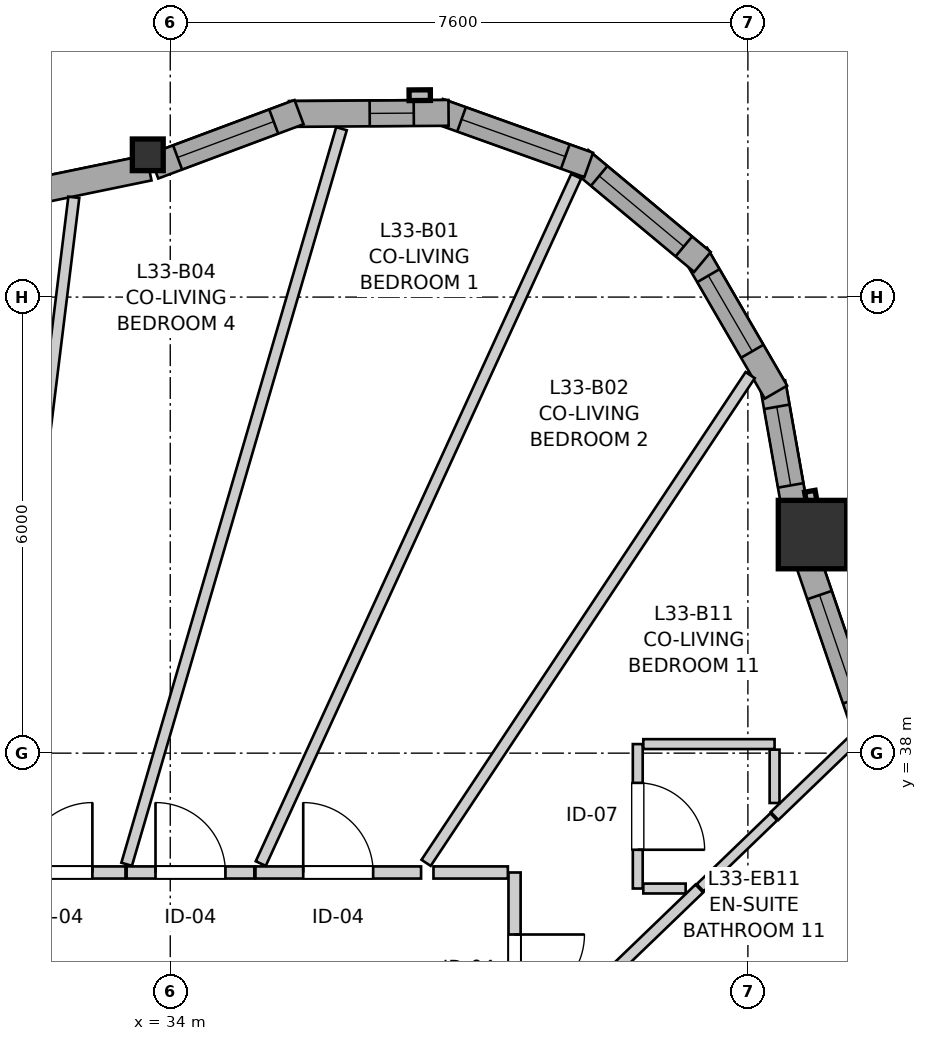
"""IFC4 building model, lengths in metres.
Left out: names, types, materials, properties, quantities, classifications, styles, units other than length and angle.
Written with IfcOpenShell. Run it as: python <this file> out.ifc"""

import sys

from ifc_helpers import new_model, si_unit, direction, frame, frame_2d, origin, origin_2d, place, context, subcontext, project, spatial, rectangle, i_section, extrude, source, transform, mapped, element, fill, save


model = new_model("IFC4")
c1 = context("Model", 3, precision=1e-05, world=origin(), true_north=direction((0.0, 1.0)))
c2 = subcontext(c1, "Body", "Model", "MODEL_VIEW")
j1 = project(units=[si_unit("LENGTHUNIT", "METRE"), si_unit("PLANEANGLEUNIT", "RADIAN")], contexts=[c1])
p1 = place(None, origin())
s1 = spatial("IfcSite", under=j1, at=p1, CompositionType="ELEMENT")
p2 = place(p1, origin())
s2 = spatial("IfcBuilding", under=s1, at=p2, CompositionType="ELEMENT")
p3 = place(p2, frame((0.0, 0.0, 112.0)))
s3 = spatial("IfcBuildingStorey", under=s2, at=p3, CompositionType="ELEMENT", Elevation=112.0)
m1 = source(origin(), c2, "Body", "SweptSolid", [
    extrude(rectangle(XDim=0.9, YDim=0.9, at=origin_2d()), origin(), (0.0, 0.0, 1.0), 2.935),
])
p4 = place(p3, frame((42.45, 40.875, 0.0), z_axis=(0.0, 0.0, 1.0), x_axis=(1.0, 0.0, 0.0)))
e1 = element("IfcColumn", 1, at=p4, inside=s3, PredefinedType="COLUMN", context=c2, shape_type="MappedRepresentation", body=[
    mapped(m1, transform((0.0, 0.0, 0.0), x_axis=(1.0, 0.0, 0.0), y_axis=(0.0, 1.0, 0.0), z_axis=(0.0, 0.0, 1.0), scale=1.0)),
])
m2 = source(origin(), c2, "Body", "SweptSolid", [
    extrude(i_section(OverallWidth=0.406, OverallDepth=0.416, WebThickness=0.027, FlangeThickness=0.044, FilletRadius=0.015, at=origin_2d()), origin(), (0.0, 0.0, 1.0), 2.935),
])
p5 = place(p3, frame((33.704, 45.872, 0.0), z_axis=(0.0, 0.0, 1.0), x_axis=(1.0, 0.0, 0.0)))
e2 = element("IfcColumn", 2, at=p5, inside=s3, PredefinedType="PILASTER", context=c2, shape_type="MappedRepresentation", body=[
    mapped(m2, transform((0.0, 0.0, 0.0), x_axis=(1.0, 0.0, 0.0), y_axis=(0.0, 1.0, 0.0), z_axis=(0.0, 0.0, 1.0), scale=1.0)),
])
p6 = place(p3, frame((43.319, 37.809, 0.0), z_axis=(0.0, 0.0, 1.0), x_axis=(-0.323586371726, 0.946198636669, 0.0)))
e3 = element("IfcWall", 3, at=p6, inside=s3, PredefinedType="SOLIDWALL", context=c2, shape_type="SweptSolid", body=[
    extrude(rectangle(XDim=2.952, YDim=0.34, at=frame_2d((1.476, 0.0))), origin(), (0.0, 0.0, 1.0), 2.465),
])
p7 = place(p6, frame((0.949, 0.0, 0.82)))
e4 = element("IfcOpeningElement", 4, at=p7, cuts=e3, PredefinedType="OPENING", context=c2, shape_type="SweptSolid", body=[
    extrude(rectangle(XDim=1.45, YDim=1.25, at=frame_2d((0.725, 0.625))), frame((0.0, 0.18, 0.0), z_axis=(0.0, -1.0, 0.0), x_axis=(1.0, 0.0, 0.0)), (0.0, 0.0, 1.0), 0.36),
])
p8 = place(p3, frame((42.242, 41.072, 0.0), z_axis=(0.0, 0.0, 1.0), x_axis=(-0.17440141227, 0.984674640375, 0.0)))
e5 = element("IfcWall", 5, at=p8, inside=s3, PredefinedType="SOLIDWALL", context=c2, shape_type="SweptSolid", body=[
    extrude(rectangle(XDim=1.831, YDim=0.34, at=frame_2d((0.916, 0.0))), origin(), (0.0, 0.0, 1.0), 2.465),
])
p9 = place(p8, frame((0.457, 0.0, 0.82)))
e6 = element("IfcOpeningElement", 6, at=p9, cuts=e5, PredefinedType="OPENING", context=c2, shape_type="SweptSolid", body=[
    extrude(rectangle(XDim=1.05, YDim=1.45, at=frame_2d((0.525, 0.725))), frame((0.0, 0.18, 0.0), z_axis=(0.0, -1.0, 0.0), x_axis=(1.0, 0.0, 0.0)), (0.0, 0.0, 1.0), 0.36),
])
p10 = place(p3, frame((41.969, 42.749, 0.0), z_axis=(0.0, 0.0, 1.0), x_axis=(-0.501989603552, 0.864873654313, 0.0)))
e7 = element("IfcWall", 7, at=p10, inside=s3, PredefinedType="SOLIDWALL", context=c2, shape_type="SweptSolid", body=[
    extrude(rectangle(XDim=2.099, YDim=0.34, at=frame_2d((1.05, 0.0))), origin(), (0.0, 0.0, 1.0), 2.465),
])
p11 = place(p10, frame((0.622, 0.0, 0.82)))
e8 = element("IfcOpeningElement", 8, at=p11, cuts=e7, PredefinedType="OPENING", context=c2, shape_type="SweptSolid", body=[
    extrude(rectangle(XDim=1.15, YDim=1.2, at=frame_2d((0.575, 0.6))), frame((0.0, 0.18, 0.0), z_axis=(0.0, -1.0, 0.0), x_axis=(1.0, 0.0, 0.0)), (0.0, 0.0, 1.0), 0.36),
])
p12 = place(p3, frame((41.002, 44.462, 0.0), z_axis=(0.0, 0.0, 1.0), x_axis=(-0.768488123124, 0.639864051669, 0.0)))
e9 = element("IfcWall", 9, at=p12, inside=s3, PredefinedType="SOLIDWALL", context=c2, shape_type="SweptSolid", body=[
    extrude(rectangle(XDim=2.099, YDim=0.34, at=frame_2d((1.05, 0.0))), origin(), (0.0, 0.0, 1.0), 2.465),
])
p13 = place(p12, frame((0.319, 0.0, 0.82)))
e10 = element("IfcOpeningElement", 10, at=p13, cuts=e9, PredefinedType="OPENING", context=c2, shape_type="SweptSolid", body=[
    extrude(rectangle(XDim=1.45, YDim=1.25, at=frame_2d((0.725, 0.625))), frame((0.0, 0.18, 0.0), z_axis=(0.0, -1.0, 0.0), x_axis=(1.0, 0.0, 0.0)), (0.0, 0.0, 1.0), 0.36),
])
p14 = place(p3, frame((39.506, 45.739, 0.0), z_axis=(0.0, 0.0, 1.0), x_axis=(-0.941486401639, 0.33705096874, 0.0)))
e11 = element("IfcWall", 11, at=p14, inside=s3, PredefinedType="SOLIDWALL", context=c2, shape_type="SweptSolid", body=[
    extrude(rectangle(XDim=2.099, YDim=0.34, at=frame_2d((1.05, 0.0))), origin(), (0.0, 0.0, 1.0), 2.465),
])
p15 = place(p14, frame((0.327, 0.0, 0.82)))
e12 = element("IfcOpeningElement", 12, at=p15, cuts=e11, PredefinedType="OPENING", context=c2, shape_type="SweptSolid", body=[
    extrude(rectangle(XDim=1.45, YDim=1.25, at=frame_2d((0.725, 0.625))), frame((0.0, 0.18, 0.0), z_axis=(0.0, -1.0, 0.0), x_axis=(1.0, 0.0, 0.0)), (0.0, 0.0, 1.0), 0.36),
])
p16 = place(p3, frame((37.662, 46.424, 0.0), z_axis=(0.0, 0.0, 1.0), x_axis=(-0.999976456891, -0.00686189939, 0.0)))
e13 = element("IfcWall", 13, at=p16, inside=s3, PredefinedType="SOLIDWALL", context=c2, shape_type="SweptSolid", body=[
    extrude(rectangle(XDim=2.099, YDim=0.34, at=frame_2d((1.05, 0.0))), origin(), (0.0, 0.0, 1.0), 2.465),
])
p17 = place(p16, frame((0.458, 0.0, 0.82)))
e14 = element("IfcOpeningElement", 14, at=p17, cuts=e13, PredefinedType="OPENING", context=c2, shape_type="SweptSolid", body=[
    extrude(rectangle(XDim=0.58, YDim=1.35, at=frame_2d((0.29, 0.675))), frame((0.0, 0.18, 0.0), z_axis=(0.0, -1.0, 0.0), x_axis=(1.0, 0.0, 0.0)), (0.0, 0.0, 1.0), 0.36),
])
p18 = place(p3, frame((35.695, 46.434, 0.0), z_axis=(0.0, 0.0, 1.0), x_axis=(-0.9368002254, -0.349864741994, 0.0)))
e15 = element("IfcWall", 15, at=p18, inside=s3, PredefinedType="SOLIDWALL", context=c2, shape_type="SweptSolid", body=[
    extrude(rectangle(XDim=2.041, YDim=0.34, at=frame_2d((1.021, 0.0))), origin(), (0.0, 0.0, 1.0), 2.465),
])
p19 = place(p18, frame((0.355, 0.0, 0.82)))
e16 = element("IfcOpeningElement", 16, at=p19, cuts=e15, PredefinedType="OPENING", context=c2, shape_type="SweptSolid", body=[
    extrude(rectangle(XDim=1.35, YDim=1.45, at=frame_2d((0.675, 0.725))), frame((0.0, 0.18, 0.0), z_axis=(0.0, -1.0, 0.0), x_axis=(1.0, 0.0, 0.0)), (0.0, 0.0, 1.0), 0.36),
])
p20 = place(p3, frame((33.719, 45.701, 0.0), z_axis=(0.0, 0.0, 1.0), x_axis=(-0.979417849231, -0.201843198072, 0.0)))
e17 = element("IfcWall", 17, at=p20, inside=s3, PredefinedType="SOLIDWALL", context=c2, shape_type="SweptSolid", body=[
    extrude(rectangle(XDim=3.113, YDim=0.34, at=frame_2d((1.557, 0.0))), origin(), (0.0, 0.0, 1.0), 2.465),
])
p21 = place(p20, frame((1.511, 0.0, 0.82)))
e18 = element("IfcOpeningElement", 18, at=p21, cuts=e17, PredefinedType="OPENING", context=c2, shape_type="SweptSolid", body=[
    extrude(rectangle(XDim=1.05, YDim=1.45, at=frame_2d((0.525, 0.725))), frame((0.0, 0.18, 0.0), z_axis=(0.0, -1.0, 0.0), x_axis=(1.0, 0.0, 0.0)), (0.0, 0.0, 1.0), 0.36),
])
p22 = place(p3, frame((38.53, 36.43, 0.0), z_axis=(0.0, 0.0, 1.0), x_axis=(0.0, -1.0, 0.0)))
e19 = element("IfcWall", 19, at=p22, inside=s3, PredefinedType="PARTITIONING", context=c2, shape_type="SweptSolid", body=[
    extrude(rectangle(XDim=2.516, YDim=0.16, at=frame_2d((1.258, 0.0))), origin(), (0.0, 0.0, 1.0), 2.573),
])
p23 = place(p22, frame((0.816, 0.0, 0.0)))
e20 = element("IfcOpeningElement", 20, at=p23, cuts=e19, PredefinedType="OPENING", context=c2, shape_type="SweptSolid", body=[
    extrude(rectangle(XDim=0.92, YDim=2.1, at=frame_2d((0.46, 1.05))), frame((0.0, 0.09, 0.0), z_axis=(0.0, -1.0, 0.0), x_axis=(1.0, 0.0, 0.0)), (0.0, 0.0, 1.0), 0.18),
])
p24 = place(p3, frame((35.121, 36.43, 0.0), z_axis=(0.0, 0.0, 1.0), x_axis=(1.0, 0.0, 0.0)))
e21 = element("IfcWall", 21, at=p24, inside=s3, PredefinedType="PARTITIONING", context=c2, shape_type="SweptSolid", body=[
    extrude(rectangle(XDim=2.179, YDim=0.16, at=frame_2d((1.089, 0.0))), origin(), (0.0, 0.0, 1.0), 2.573),
])
p25 = place(p24, frame((0.628, 0.0, 0.0)))
e22 = element("IfcOpeningElement", 22, at=p25, cuts=e21, PredefinedType="OPENING", context=c2, shape_type="SweptSolid", body=[
    extrude(rectangle(XDim=0.92, YDim=2.1, at=frame_2d((0.46, 1.05))), frame((0.0, 0.09, 0.0), z_axis=(0.0, -1.0, 0.0), x_axis=(1.0, 0.0, 0.0)), (0.0, 0.0, 1.0), 0.18),
])
p26 = place(p3, frame((40.151, 38.119, 0.0), z_axis=(0.0, 0.0, 1.0), x_axis=(0.0, -1.0, 0.0)))
e23 = element("IfcWall", 23, at=p26, inside=s3, PredefinedType="PARTITIONING", context=c2, shape_type="SweptSolid", body=[
    extrude(rectangle(XDim=1.9, YDim=0.13, at=frame_2d((0.95, 0.0))), origin(), (0.0, 0.0, 1.0), 2.935),
])
p27 = place(p26, frame((0.51, 0.0, 0.0)))
e24 = element("IfcOpeningElement", 24, at=p27, cuts=e23, PredefinedType="OPENING", context=c2, shape_type="SweptSolid", body=[
    extrude(rectangle(XDim=0.88, YDim=2.05, at=frame_2d((0.44, 1.025))), frame((0.0, 0.075, 0.0), z_axis=(0.0, -1.0, 0.0), x_axis=(1.0, 0.0, 0.0)), (0.0, 0.0, 1.0), 0.15),
])
p28 = place(p3, frame((31.666, 36.43, 0.0), z_axis=(0.0, 0.0, 1.0), x_axis=(1.0, 0.0, 0.0)))
e25 = element("IfcWall", 25, at=p28, inside=s3, PredefinedType="PARTITIONING", context=c2, shape_type="SweptSolid", body=[
    extrude(rectangle(XDim=1.745, YDim=0.16, at=frame_2d((0.873, 0.0))), origin(), (0.0, 0.0, 1.0), 2.935),
])
p29 = place(p28, frame((0.389, 0.0, 0.0)))
e26 = element("IfcOpeningElement", 26, at=p29, cuts=e25, PredefinedType="OPENING", context=c2, shape_type="SweptSolid", body=[
    extrude(rectangle(XDim=0.92, YDim=2.1, at=frame_2d((0.46, 1.05))), frame((0.0, 0.09, 0.0), z_axis=(0.0, -1.0, 0.0), x_axis=(1.0, 0.0, 0.0)), (0.0, 0.0, 1.0), 0.18),
])
p30 = place(p3, frame((33.426, 36.43, 0.0), z_axis=(0.0, 0.0, 1.0), x_axis=(1.0, 0.0, 0.0)))
e27 = element("IfcWall", 27, at=p30, inside=s3, PredefinedType="PARTITIONING", context=c2, shape_type="SweptSolid", body=[
    extrude(rectangle(XDim=1.68, YDim=0.16, at=frame_2d((0.84, 0.0))), origin(), (0.0, 0.0, 1.0), 2.935),
])
p31 = place(p30, frame((0.38, 0.0, 0.0)))
e28 = element("IfcOpeningElement", 28, at=p31, cuts=e27, PredefinedType="OPENING", context=c2, shape_type="SweptSolid", body=[
    extrude(rectangle(XDim=0.92, YDim=2.1, at=frame_2d((0.46, 1.05))), frame((0.0, 0.09, 0.0), z_axis=(0.0, -1.0, 0.0), x_axis=(1.0, 0.0, 0.0)), (0.0, 0.0, 1.0), 0.18),
])
p32 = place(p3, frame((33.427, 36.538, 0.0), z_axis=(0.0, 0.0, 1.0), x_axis=(0.280326379037, 0.959904745908, 0.0)))
e29 = element("IfcWall", 29, at=p32, inside=s3, PredefinedType="PARTITIONING", context=c2, shape_type="SweptSolid", body=[
    extrude(rectangle(XDim=10.082, YDim=0.145, at=frame_2d((5.041, 0.0))), origin(), (0.0, 0.0, 1.0), 2.935),
])
p33 = place(p3, frame((35.191, 36.548, 0.0), z_axis=(0.0, 0.0, 1.0), x_axis=(0.417154036681, 0.908835799075, 0.0)))
e30 = element("IfcWall", 30, at=p33, inside=s3, PredefinedType="PARTITIONING", context=c2, shape_type="SweptSolid", body=[
    extrude(rectangle(XDim=9.949, YDim=0.145, at=frame_2d((4.974, 0.0))), origin(), (0.0, 0.0, 1.0), 2.935),
])
p34 = place(p3, frame((31.648, 36.527, 0.0), z_axis=(0.0, 0.0, 1.0), x_axis=(0.122371290087, 0.992484391496, 0.0)))
e31 = element("IfcWall", 31, at=p34, inside=s3, PredefinedType="PARTITIONING", context=c2, shape_type="SweptSolid", body=[
    extrude(rectangle(XDim=8.852, YDim=0.145, at=frame_2d((4.426, 0.0))), origin(), (0.0, 0.0, 1.0), 2.935),
])
p35 = place(p3, frame((37.366, 36.557, 0.0), z_axis=(0.0, 0.0, 1.0), x_axis=(0.553463679146, 0.832873313215, 0.0)))
e32 = element("IfcWall", 32, at=p35, inside=s3, PredefinedType="PARTITIONING", context=c2, shape_type="SweptSolid", body=[
    extrude(rectangle(XDim=7.704, YDim=0.145, at=frame_2d((3.852, 0.0))), origin(), (0.0, 0.0, 1.0), 2.935),
])
p36 = place(p3, frame((38.666, 34.009, 0.0), z_axis=(0.0, 0.0, 1.0), x_axis=(0.72031454127, 0.693647577402, 0.0)))
e33 = element("IfcWall", 33, at=p36, inside=s3, PredefinedType="PARTITIONING", context=c2, shape_type="SweptSolid", body=[
    extrude(rectangle(XDim=3.186, YDim=0.145, at=frame_2d((1.593, 0.0))), origin(), (0.0, 0.0, 1.0), 2.935),
])
p37 = place(p3, frame((40.224, 38.119, 0.0), z_axis=(0.0, 0.0, 1.0), x_axis=(1.0, 0.0, 0.0)))
e34 = element("IfcWall", 34, at=p37, inside=s3, PredefinedType="PARTITIONING", context=c2, shape_type="SweptSolid", body=[
    extrude(rectangle(XDim=1.727, YDim=0.13, at=frame_2d((0.863, 0.0))), origin(), (0.0, 0.0, 1.0), 2.935),
])
p38 = place(p3, frame((41.951, 37.173, 0.0), z_axis=(0.0, 0.0, 1.0), x_axis=(0.720559112487, 0.693393514111, 0.0)))
e35 = element("IfcWall", 35, at=p38, inside=s3, PredefinedType="PARTITIONING", context=c2, shape_type="SweptSolid", body=[
    extrude(rectangle(XDim=1.456, YDim=0.145, at=frame_2d((0.728, 0.0))), origin(), (0.0, 0.0, 1.0), 2.935),
])
p39 = place(p3, frame((40.972, 36.229, 0.0), z_axis=(0.0, 0.0, 1.0), x_axis=(0.72014550452, 0.693823069896, 0.0)))
e36 = element("IfcWall", 36, at=p39, inside=s3, PredefinedType="PARTITIONING", context=c2, shape_type="SweptSolid", body=[
    extrude(rectangle(XDim=1.345, YDim=0.13, at=frame_2d((0.672, 0.0))), origin(), (0.0, 0.0, 1.0), 2.935),
])
p40 = place(p3, frame((37.463, 36.43, 0.0), z_axis=(0.0, 0.0, 1.0), x_axis=(1.0, 0.0, 0.0)))
e37 = element("IfcWall", 37, at=p40, inside=s3, PredefinedType="PARTITIONING", context=c2, shape_type="SweptSolid", body=[
    extrude(rectangle(XDim=0.979, YDim=0.16, at=frame_2d((0.489, 0.0))), origin(), (0.0, 0.0, 1.0), 2.573),
])
p41 = place(p3, frame((41.951, 37.344, 0.0), z_axis=(0.0, 0.0, 1.0), x_axis=(0.0, 1.0, 0.0)))
e38 = element("IfcWall", 38, at=p41, inside=s3, PredefinedType="PARTITIONING", context=c2, shape_type="SweptSolid", body=[
    extrude(rectangle(XDim=0.702, YDim=0.13, at=frame_2d((0.351, 0.0))), origin(), (0.0, 0.0, 1.0), 2.935),
])
p42 = place(p3, frame((40.224, 36.219, 0.0), z_axis=(0.0, 0.0, 1.0), x_axis=(1.0, 0.0, 0.0)))
e39 = element("IfcWall", 39, at=p42, inside=s3, PredefinedType="PARTITIONING", context=c2, shape_type="SweptSolid", body=[
    extrude(rectangle(XDim=0.557, YDim=0.13, at=frame_2d((0.278, 0.0))), origin(), (0.0, 0.0, 1.0), 2.935),
])
m3 = source(origin(), c2, "Body", "SweptSolid", [
    extrude(rectangle(XDim=1.45, YDim=1.25, at=frame_2d((0.725, 0.625))), frame((0.0, 0.03, 0.0), z_axis=(0.0, -1.0, 0.0), x_axis=(1.0, 0.0, 0.0)), (0.0, 0.0, 1.0), 0.06),
])
p43 = place(p7, origin())
e40 = element("IfcWindow", 40, at=p43, inside=s3, PartitioningType="SINGLE_PANEL", PredefinedType="WINDOW", context=c2, shape_type="MappedRepresentation", body=[
    mapped(m3, transform((0.0, 0.0, 0.0), x_axis=(1.0, 0.0, 0.0), y_axis=(0.0, 1.0, 0.0), z_axis=(0.0, 0.0, 1.0), scale=1.0)),
])
fill(e4, e40)
m4 = source(origin(), c2, "Body", "SweptSolid", [
    extrude(rectangle(XDim=1.05, YDim=1.45, at=frame_2d((0.525, 0.725))), frame((0.0, 0.03, 0.0), z_axis=(0.0, -1.0, 0.0), x_axis=(1.0, 0.0, 0.0)), (0.0, 0.0, 1.0), 0.06),
])
p44 = place(p9, origin())
e41 = element("IfcWindow", 41, at=p44, inside=s3, PartitioningType="SINGLE_PANEL", PredefinedType="WINDOW", context=c2, shape_type="MappedRepresentation", body=[
    mapped(m4, transform((0.0, 0.0, 0.0), x_axis=(1.0, 0.0, 0.0), y_axis=(0.0, 1.0, 0.0), z_axis=(0.0, 0.0, 1.0), scale=1.0)),
])
fill(e6, e41)
m5 = source(origin(), c2, "Body", "SweptSolid", [
    extrude(rectangle(XDim=1.15, YDim=1.2, at=frame_2d((0.575, 0.6))), frame((0.0, 0.03, 0.0), z_axis=(0.0, -1.0, 0.0), x_axis=(1.0, 0.0, 0.0)), (0.0, 0.0, 1.0), 0.06),
])
p45 = place(p11, origin())
e42 = element("IfcWindow", 42, at=p45, inside=s3, PartitioningType="SINGLE_PANEL", PredefinedType="WINDOW", context=c2, shape_type="MappedRepresentation", body=[
    mapped(m5, transform((0.0, 0.0, 0.0), x_axis=(1.0, 0.0, 0.0), y_axis=(0.0, 1.0, 0.0), z_axis=(0.0, 0.0, 1.0), scale=1.0)),
])
fill(e8, e42)
p46 = place(p13, origin())
e43 = element("IfcWindow", 43, at=p46, inside=s3, PartitioningType="SINGLE_PANEL", PredefinedType="WINDOW", context=c2, shape_type="MappedRepresentation", body=[
    mapped(m3, transform((0.0, 0.0, 0.0), x_axis=(1.0, 0.0, 0.0), y_axis=(0.0, 1.0, 0.0), z_axis=(0.0, 0.0, 1.0), scale=1.0)),
])
fill(e10, e43)
p47 = place(p15, origin())
e44 = element("IfcWindow", 44, at=p47, inside=s3, PartitioningType="SINGLE_PANEL", PredefinedType="WINDOW", context=c2, shape_type="MappedRepresentation", body=[
    mapped(m3, transform((0.0, 0.0, 0.0), x_axis=(1.0, 0.0, 0.0), y_axis=(0.0, 1.0, 0.0), z_axis=(0.0, 0.0, 1.0), scale=1.0)),
])
fill(e12, e44)
m6 = source(origin(), c2, "Body", "SweptSolid", [
    extrude(rectangle(XDim=0.58, YDim=1.35, at=frame_2d((0.29, 0.675))), frame((0.0, 0.03, 0.0), z_axis=(0.0, -1.0, 0.0), x_axis=(1.0, 0.0, 0.0)), (0.0, 0.0, 1.0), 0.06),
])
p48 = place(p17, origin())
e45 = element("IfcWindow", 45, at=p48, inside=s3, PartitioningType="SINGLE_PANEL", PredefinedType="WINDOW", context=c2, shape_type="MappedRepresentation", body=[
    mapped(m6, transform((0.0, 0.0, 0.0), x_axis=(1.0, 0.0, 0.0), y_axis=(0.0, 1.0, 0.0), z_axis=(0.0, 0.0, 1.0), scale=1.0)),
])
fill(e14, e45)
m7 = source(origin(), c2, "Body", "SweptSolid", [
    extrude(rectangle(XDim=1.35, YDim=1.45, at=frame_2d((0.675, 0.725))), frame((0.0, 0.03, 0.0), z_axis=(0.0, -1.0, 0.0), x_axis=(1.0, 0.0, 0.0)), (0.0, 0.0, 1.0), 0.06),
])
p49 = place(p19, origin())
e46 = element("IfcWindow", 46, at=p49, inside=s3, PartitioningType="SINGLE_PANEL", PredefinedType="WINDOW", context=c2, shape_type="MappedRepresentation", body=[
    mapped(m7, transform((0.0, 0.0, 0.0), x_axis=(1.0, 0.0, 0.0), y_axis=(0.0, 1.0, 0.0), z_axis=(0.0, 0.0, 1.0), scale=1.0)),
])
fill(e16, e46)
m8 = source(origin(), c2, "Body", "SweptSolid", [
    extrude(rectangle(XDim=0.92, YDim=2.1, at=frame_2d((0.46, 1.05))), frame((0.0, 0.025, 0.0), z_axis=(0.0, -1.0, 0.0), x_axis=(1.0, 0.0, 0.0)), (0.0, 0.0, 1.0), 0.05),
])
p50 = place(p23, origin())
e47 = element("IfcDoor", 47, at=p50, inside=s3, OperationType="SINGLE_SWING_LEFT", PredefinedType="DOOR", context=c2, shape_type="MappedRepresentation", body=[
    mapped(m8, transform((0.0, 0.0, 0.0), x_axis=(1.0, 0.0, 0.0), y_axis=(0.0, 1.0, 0.0), z_axis=(0.0, 0.0, 1.0), scale=1.0)),
])
fill(e20, e47)
p51 = place(p25, origin())
e48 = element("IfcDoor", 48, at=p51, inside=s3, OperationType="SINGLE_SWING_LEFT", PredefinedType="DOOR", context=c2, shape_type="MappedRepresentation", body=[
    mapped(m8, transform((0.0, 0.0, 0.0), x_axis=(1.0, 0.0, 0.0), y_axis=(0.0, 1.0, 0.0), z_axis=(0.0, 0.0, 1.0), scale=1.0)),
])
fill(e22, e48)
m9 = source(origin(), c2, "Body", "SweptSolid", [
    extrude(rectangle(XDim=0.88, YDim=2.05, at=frame_2d((0.44, 1.025))), frame((0.0, 0.025, 0.0), z_axis=(0.0, -1.0, 0.0), x_axis=(1.0, 0.0, 0.0)), (0.0, 0.0, 1.0), 0.05),
])
p52 = place(p27, origin())
e49 = element("IfcDoor", 49, at=p52, inside=s3, OperationType="SINGLE_SWING_RIGHT", PredefinedType="DOOR", context=c2, shape_type="MappedRepresentation", body=[
    mapped(m9, transform((0.0, 0.0, 0.0), x_axis=(1.0, 0.0, 0.0), y_axis=(0.0, 1.0, 0.0), z_axis=(0.0, 0.0, 1.0), scale=1.0)),
])
fill(e24, e49)
p53 = place(p29, origin())
e50 = element("IfcDoor", 50, at=p53, inside=s3, OperationType="SINGLE_SWING_RIGHT", PredefinedType="DOOR", context=c2, shape_type="MappedRepresentation", body=[
    mapped(m8, transform((0.0, 0.0, 0.0), x_axis=(1.0, 0.0, 0.0), y_axis=(0.0, 1.0, 0.0), z_axis=(0.0, 0.0, 1.0), scale=1.0)),
])
fill(e26, e50)
p54 = place(p31, origin())
e51 = element("IfcDoor", 51, at=p54, inside=s3, OperationType="SINGLE_SWING_LEFT", PredefinedType="DOOR", context=c2, shape_type="MappedRepresentation", body=[
    mapped(m8, transform((0.0, 0.0, 0.0), x_axis=(1.0, 0.0, 0.0), y_axis=(0.0, 1.0, 0.0), z_axis=(0.0, 0.0, 1.0), scale=1.0)),
])
fill(e28, e51)
save(model, sys.argv[1])
